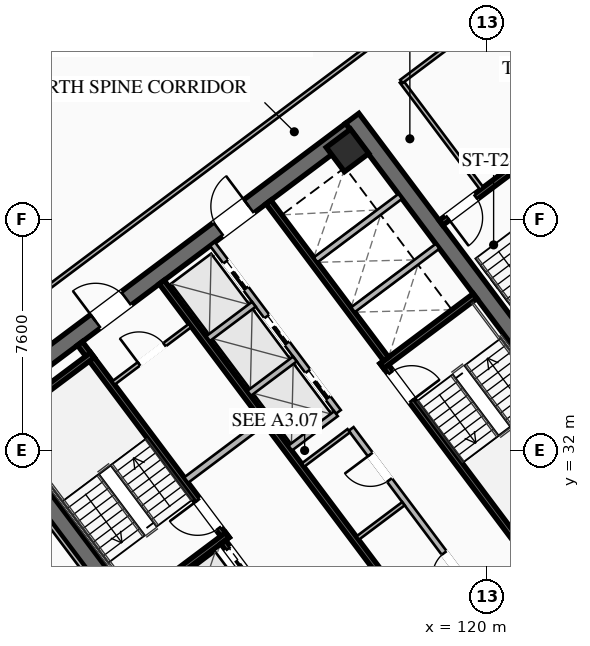
"""IFC4 building model, lengths in metres.
Left out: names, types, materials, properties, quantities, classifications, styles, units other than length and angle.
Written with IfcOpenShell. Run it as: python <this file> out.ifc"""

import sys

from ifc_helpers import new_model, si_unit, direction, frame, frame_2d, origin, origin_2d, place, context, subcontext, project, spatial, rectangle, hollow_rectangle, extrude, element, fill, save


model = new_model("IFC4")
c1 = context("Model", 3, precision=1e-05, world=origin(), true_north=direction((0.0, 1.0)))
c2 = subcontext(c1, "Body", "Model", "MODEL_VIEW")
j1 = project(units=[si_unit("LENGTHUNIT", "METRE"), si_unit("PLANEANGLEUNIT", "RADIAN")], contexts=[c1])
p1 = place(None, origin())
s1 = spatial("IfcSite", under=j1, at=p1, CompositionType="ELEMENT")
p2 = place(p1, origin())
s2 = spatial("IfcBuilding", under=s1, at=p2, CompositionType="ELEMENT")
p3 = place(p2, frame((0.0, 0.0, 121.5)))
s3 = spatial("IfcBuildingStorey", under=s2, at=p3, CompositionType="ELEMENT", Elevation=121.5)
for number, where, z_axis, x_axis in (
    (1, (112.436, 21.077, 0.0), (0.0, 0.0, 1.0), (-0.6, 0.8, 0.0)),
    (2, (115.564, 42.923, 0.0), (0.0, 0.0, 1.0), (0.6, -0.8, 0.0)),
):
    element("IfcWall", number, at=place(p3, frame(where, z_axis=z_axis, x_axis=x_axis)), inside=s3, PredefinedType="SHEAR", context=c2, shape_type="SweptSolid", body=[
        extrude(rectangle(XDim=15.6, YDim=0.55, at=frame_2d((7.8, 0.0))), origin(), (0.0, 0.0, 1.0), 3.55),
    ])
p4 = place(p3, frame((124.539, 30.498, 0.0), z_axis=(0.0, 0.0, 1.0), x_axis=(-0.799998054672, -0.600002593761, 0.0)))
e3 = element("IfcWall", 3, at=p4, inside=s3, PredefinedType="SHEAR", context=c2, shape_type="SweptSolid", body=[
    extrude(rectangle(XDim=15.06, YDim=0.55, at=frame_2d((7.53, 0.0))), origin(), (0.0, 0.0, 1.0), 3.55),
])
p5 = place(p4, frame((9.23, 0.0, 0.0)))
e4 = element("IfcOpeningElement", 4, at=p5, cuts=e3, PredefinedType="OPENING", context=c2, shape_type="SweptSolid", body=[
    extrude(rectangle(XDim=1.25, YDim=2.25, at=frame_2d((0.625, 1.125))), frame((0.0, 0.285, 0.0), z_axis=(0.0, -1.0, 0.0), x_axis=(1.0, 0.0, 0.0)), (0.0, 0.0, 1.0), 0.57),
])
p6 = place(p4, frame((4.18, 0.0, 0.0)))
e5 = element("IfcOpeningElement", 5, at=p6, cuts=e3, PredefinedType="OPENING", context=c2, shape_type="SweptSolid", body=[
    extrude(rectangle(XDim=1.25, YDim=2.25, at=frame_2d((0.625, 1.125))), frame((0.0, 0.285, 0.0), z_axis=(0.0, -1.0, 0.0), x_axis=(1.0, 0.0, 0.0)), (0.0, 0.0, 1.0), 0.57),
])
p7 = place(p3, frame((103.461, 33.502, 0.0), z_axis=(0.0, 0.0, 1.0), x_axis=(0.799998054672, 0.600002593761, 0.0)))
e6 = element("IfcWall", 6, at=p7, inside=s3, PredefinedType="SHEAR", context=c2, shape_type="SweptSolid", body=[
    extrude(rectangle(XDim=15.06, YDim=0.55, at=frame_2d((7.53, 0.0))), origin(), (0.0, 0.0, 1.0), 3.55),
])
p8 = place(p7, frame((4.58, 0.0, 0.0)))
e7 = element("IfcOpeningElement", 7, at=p8, cuts=e6, PredefinedType="OPENING", context=c2, shape_type="SweptSolid", body=[
    extrude(rectangle(XDim=1.25, YDim=2.25, at=frame_2d((0.625, 1.125))), frame((0.0, 0.285, 0.0), z_axis=(0.0, -1.0, 0.0), x_axis=(1.0, 0.0, 0.0)), (0.0, 0.0, 1.0), 0.57),
])
p9 = place(p7, frame((9.63, 0.0, 0.0)))
e8 = element("IfcOpeningElement", 8, at=p9, cuts=e6, PredefinedType="OPENING", context=c2, shape_type="SweptSolid", body=[
    extrude(rectangle(XDim=1.25, YDim=2.25, at=frame_2d((0.625, 1.125))), frame((0.0, 0.285, 0.0), z_axis=(0.0, -1.0, 0.0), x_axis=(1.0, 0.0, 0.0)), (0.0, 0.0, 1.0), 0.57),
])
p10 = place(p3, frame((115.41, 41.87, 0.0), z_axis=(0.0, 0.0, 1.0), x_axis=(0.799999996291, 0.600000004945, 0.0)))
e9 = element("IfcColumn", 9, at=p10, inside=s3, PredefinedType="COLUMN", context=c2, shape_type="SweptSolid", body=[
    extrude(hollow_rectangle(XDim=1.0, YDim=1.0, WallThickness=0.04, at=origin_2d()), origin(), (0.0, 0.0, 1.0), 3.37),
])
p11 = place(p3, frame((111.44, 29.08, 0.0), z_axis=(0.0, 0.0, 1.0), x_axis=(-0.59999029481, 0.8000072788, 0.0)))
e10 = element("IfcWall", 10, at=p11, inside=s3, PredefinedType="SHEAR", context=c2, shape_type="SweptSolid", body=[
    extrude(rectangle(XDim=8.05, YDim=0.2, at=frame_2d((4.025, 0.0))), origin(), (0.0, 0.0, 1.0), 3.37),
])
p12 = place(p11, frame((0.45, 0.0, 0.0)))
e11 = element("IfcOpeningElement", 11, at=p12, cuts=e10, PredefinedType="OPENING", context=c2, shape_type="SweptSolid", body=[
    extrude(rectangle(XDim=1.15, YDim=2.2, at=frame_2d((0.575, 1.1))), frame((0.0, 0.11, 0.0), z_axis=(0.0, -1.0, 0.0), x_axis=(1.0, 0.0, 0.0)), (0.0, 0.0, 1.0), 0.22),
])
for number, where, z_axis, x_axis in (
    (12, (108.396, 26.922, 0.0), (0.0, 0.0, 1.0), (0.8, 0.6, 0.0)),
    (13, (103.956, 32.842, 0.0), (0.0, 0.0, 1.0), (0.8, 0.6, 0.0)),
):
    element("IfcWall", number, at=place(p3, frame(where, z_axis=z_axis, x_axis=x_axis)), inside=s3, PredefinedType="SHEAR", context=c2, shape_type="SweptSolid", body=[
        extrude(rectangle(XDim=3.83, YDim=0.2, at=frame_2d((1.915, 0.0))), origin(), (0.0, 0.0, 1.0), 3.37),
    ])
p13 = place(p3, frame((116.56, 34.92, 0.0), z_axis=(0.0, 0.0, 1.0), x_axis=(0.59999029481, -0.8000072788, 0.0)))
e14 = element("IfcWall", 14, at=p13, inside=s3, PredefinedType="SHEAR", context=c2, shape_type="SweptSolid", body=[
    extrude(rectangle(XDim=8.05, YDim=0.2, at=frame_2d((4.025, 0.0))), origin(), (0.0, 0.0, 1.0), 3.37),
])
p14 = place(p13, frame((0.45, 0.0, 0.0)))
e15 = element("IfcOpeningElement", 15, at=p14, cuts=e14, PredefinedType="OPENING", context=c2, shape_type="SweptSolid", body=[
    extrude(rectangle(XDim=1.15, YDim=2.2, at=frame_2d((0.575, 1.1))), frame((0.0, 0.11, 0.0), z_axis=(0.0, -1.0, 0.0), x_axis=(1.0, 0.0, 0.0)), (0.0, 0.0, 1.0), 0.22),
])
p15 = place(p3, frame((116.54, 34.78, 0.0), z_axis=(0.0, 0.0, 1.0), x_axis=(0.800015298837, 0.599979601008, 0.0)))
e16 = element("IfcWall", 16, at=p15, inside=s3, PredefinedType="SHEAR", context=c2, shape_type="SweptSolid", body=[
    extrude(rectangle(XDim=3.83, YDim=0.2, at=frame_2d((1.915, 0.0))), origin(), (0.0, 0.0, 1.0), 3.37),
])
p16 = place(p3, frame((117.998, 25.936, 0.0), z_axis=(0.0, 0.0, 1.0), x_axis=(-0.600002693989, 0.799997979501, 0.0)))
e17 = element("IfcWall", 17, at=p16, inside=s3, PredefinedType="SHEAR", context=c2, shape_type="SweptSolid", body=[
    extrude(rectangle(XDim=14.5, YDim=0.2, at=frame_2d((7.25, 0.0))), origin(), (0.0, 0.0, 1.0), 3.37),
])
p17 = place(p3, frame((110.104, 31.028, 0.0), z_axis=(0.0, 0.0, 1.0), x_axis=(0.800018601094, 0.59997519774, 0.0)))
e18 = element("IfcWall", 18, at=p17, inside=s3, PredefinedType="SOLIDWALL", context=c2, shape_type="SweptSolid", body=[
    extrude(rectangle(XDim=3.15, YDim=0.22, at=frame_2d((1.575, 0.0))), origin(), (0.0, 0.0, 1.0), 2.723),
])
p18 = place(p3, frame((115.19, 23.83, 0.0), z_axis=(0.0, 0.0, 1.0), x_axis=(-0.599993943644, 0.800004542231, 0.0)))
e19 = element("IfcWall", 19, at=p18, inside=s3, PredefinedType="SHEAR", context=c2, shape_type="SweptSolid", body=[
    extrude(rectangle(XDim=6.45, YDim=0.2, at=frame_2d((3.225, 0.0))), origin(), (0.0, 0.0, 1.0), 3.37),
])
p19 = place(p18, frame((4.875, 0.0, 0.0)))
e20 = element("IfcOpeningElement", 20, at=p19, cuts=e19, PredefinedType="OPENING", context=c2, shape_type="SweptSolid", body=[
    extrude(rectangle(XDim=1.3, YDim=2.25, at=frame_2d((0.65, 1.125))), frame((0.0, 0.11, 0.0), z_axis=(0.0, -1.0, 0.0), x_axis=(1.0, 0.0, 0.0)), (0.0, 0.0, 1.0), 0.22),
])
p20 = place(p18, frame((2.875, 0.0, 0.0)))
e21 = element("IfcOpeningElement", 21, at=p20, cuts=e19, PredefinedType="OPENING", context=c2, shape_type="SweptSolid", body=[
    extrude(rectangle(XDim=1.3, YDim=2.25, at=frame_2d((0.65, 1.125))), frame((0.0, 0.11, 0.0), z_axis=(0.0, -1.0, 0.0), x_axis=(1.0, 0.0, 0.0)), (0.0, 0.0, 1.0), 0.22),
])
p21 = place(p18, frame((0.675, 0.0, 0.0)))
e22 = element("IfcOpeningElement", 22, at=p21, cuts=e19, PredefinedType="OPENING", context=c2, shape_type="SweptSolid", body=[
    extrude(rectangle(XDim=1.3, YDim=2.25, at=frame_2d((0.65, 1.125))), frame((0.0, 0.11, 0.0), z_axis=(0.0, -1.0, 0.0), x_axis=(1.0, 0.0, 0.0)), (0.0, 0.0, 1.0), 0.22),
])
p22 = place(p3, frame((112.81, 40.17, 0.0), z_axis=(0.0, 0.0, 1.0), x_axis=(0.599993943644, -0.800004542231, 0.0)))
e23 = element("IfcWall", 23, at=p22, inside=s3, PredefinedType="SHEAR", context=c2, shape_type="SweptSolid", body=[
    extrude(rectangle(XDim=6.45, YDim=0.2, at=frame_2d((3.225, 0.0))), origin(), (0.0, 0.0, 1.0), 3.37),
])
for number, where, z_axis, x_axis in (
    (24, (115.59, 36.63, 0.0), (0.0, 0.0, 1.0), (0.8, 0.6, 0.0)),
    (25, (114.36, 38.27, 0.0), (0.0, 0.0, 1.0), (0.8, 0.6, 0.0)),
):
    element("IfcWall", number, at=place(p3, frame(where, z_axis=z_axis, x_axis=x_axis)), inside=s3, PredefinedType="SOLIDWALL", context=c2, shape_type="SweptSolid", body=[
        extrude(rectangle(XDim=3.48, YDim=0.2, at=frame_2d((1.74, 0.0))), origin(), (0.0, 0.0, 1.0), 3.37),
    ])
p23 = place(p3, frame((107.71, 34.22, 0.0), z_axis=(0.0, 0.0, 1.0), x_axis=(0.799981399002, 0.60002480053, 0.0)))
e26 = element("IfcWall", 26, at=p23, inside=s3, PredefinedType="PARTITIONING", context=c2, shape_type="SweptSolid", body=[
    extrude(rectangle(XDim=3.15, YDim=0.135, at=frame_2d((1.575, 0.0))), origin(), (0.0, 0.0, 1.0), 2.723),
])
p24 = place(p23, frame((1.05, 0.0, 0.0)))
e27 = element("IfcOpeningElement", 27, at=p24, cuts=e26, PredefinedType="OPENING", context=c2, shape_type="SweptSolid", body=[
    extrude(rectangle(XDim=1.05, YDim=2.2, at=frame_2d((0.525, 1.1))), frame((0.0, 0.077, 0.0), z_axis=(0.0, -1.0, 0.0), x_axis=(1.0, 0.0, 0.0)), (0.0, 0.0, 1.0), 0.155),
])
p25 = place(p3, frame((119.67, 27.19, 0.0), z_axis=(0.0, 0.0, 1.0), x_axis=(-0.599988677396, 0.800008491828, 0.0)))
e28 = element("IfcWall", 28, at=p25, inside=s3, PredefinedType="SOLIDWALL", context=c2, shape_type="SweptSolid", body=[
    extrude(rectangle(XDim=6.9, YDim=0.2, at=frame_2d((3.45, 0.0))), origin(), (0.0, 0.0, 1.0), 2.723),
])
p26 = place(p25, frame((0.85, 0.0, 0.0)))
e29 = element("IfcOpeningElement", 29, at=p26, cuts=e28, PredefinedType="OPENING", context=c2, shape_type="SweptSolid", body=[
    extrude(rectangle(XDim=0.95, YDim=2.05, at=frame_2d((0.475, 1.025))), frame((0.0, 0.11, 0.0), z_axis=(0.0, -1.0, 0.0), x_axis=(1.0, 0.0, 0.0)), (0.0, 0.0, 1.0), 0.22),
])
p27 = place(p25, frame((4.8, 0.0, 0.0)))
e30 = element("IfcOpeningElement", 30, at=p27, cuts=e28, PredefinedType="OPENING", context=c2, shape_type="SweptSolid", body=[
    extrude(rectangle(XDim=1.05, YDim=2.2, at=frame_2d((0.525, 1.1))), frame((0.0, 0.11, 0.0), z_axis=(0.0, -1.0, 0.0), x_axis=(1.0, 0.0, 0.0)), (0.0, 0.0, 1.0), 0.22),
])
for number, where, z_axis, x_axis in (
    (31, (113.946, 31.522, 0.0), (0.0, 0.0, 1.0), (0.8, 0.6, 0.0)),
    (32, (115.746, 29.122, 0.0), (0.0, 0.0, 1.0), (0.8, 0.6, 0.0)),
):
    element("IfcWall", number, at=place(p3, frame(where, z_axis=z_axis, x_axis=x_axis)), inside=s3, PredefinedType="PARTITIONING", context=c2, shape_type="SweptSolid", body=[
        extrude(rectangle(XDim=1.88, YDim=0.135, at=frame_2d((0.94, 0.0))), origin(), (0.0, 0.0, 1.0), 2.723),
    ])
p28 = place(p3, frame((115.11, 33.27, 0.0), z_axis=(0.0, 0.0, 1.0), x_axis=(-0.600011322243, 0.799991508192, 0.0)))
e33 = element("IfcWall", 33, at=p28, inside=s3, PredefinedType="SOLIDWALL", context=c2, shape_type="SweptSolid", body=[
    extrude(rectangle(XDim=6.9, YDim=0.2, at=frame_2d((3.45, 0.0))), origin(), (0.0, 0.0, 1.0), 3.37),
])
p29 = place(p28, frame((0.575, 0.0, 0.0)))
e34 = element("IfcOpeningElement", 34, at=p29, cuts=e33, PredefinedType="OPENING", context=c2, shape_type="SweptSolid", body=[
    extrude(rectangle(XDim=1.1, YDim=2.2, at=frame_2d((0.55, 1.1))), frame((0.0, 0.11, 0.0), z_axis=(0.0, -1.0, 0.0), x_axis=(1.0, 0.0, 0.0)), (0.0, 0.0, 1.0), 0.22),
])
p30 = place(p28, frame((2.825, 0.0, 0.0)))
e35 = element("IfcOpeningElement", 35, at=p30, cuts=e33, PredefinedType="OPENING", context=c2, shape_type="SweptSolid", body=[
    extrude(rectangle(XDim=1.1, YDim=2.2, at=frame_2d((0.55, 1.1))), frame((0.0, 0.11, 0.0), z_axis=(0.0, -1.0, 0.0), x_axis=(1.0, 0.0, 0.0)), (0.0, 0.0, 1.0), 0.22),
])
p31 = place(p28, frame((5.075, 0.0, 0.0)))
e36 = element("IfcOpeningElement", 36, at=p31, cuts=e33, PredefinedType="OPENING", context=c2, shape_type="SweptSolid", body=[
    extrude(rectangle(XDim=1.1, YDim=2.2, at=frame_2d((0.55, 1.1))), frame((0.0, 0.11, 0.0), z_axis=(0.0, -1.0, 0.0), x_axis=(1.0, 0.0, 0.0)), (0.0, 0.0, 1.0), 0.22),
])
p32 = place(p3, frame((113.526, 32.082, 0.0), z_axis=(0.0, 0.0, 1.0), x_axis=(0.800046745961, 0.599937666993, 0.0)))
e37 = element("IfcWall", 37, at=p32, inside=s3, PredefinedType="SOLIDWALL", context=c2, shape_type="SweptSolid", body=[
    extrude(rectangle(XDim=1.88, YDim=0.2, at=frame_2d((0.94, 0.0))), origin(), (0.0, 0.0, 1.0), 3.37),
])
p33 = place(p3, frame((112.176, 33.882, 0.0), z_axis=(0.0, 0.0, 1.0), x_axis=(0.8, 0.6, 0.0)))
e38 = element("IfcWall", 38, at=p33, inside=s3, PredefinedType="SOLIDWALL", context=c2, shape_type="SweptSolid", body=[
    extrude(rectangle(XDim=1.88, YDim=0.2, at=frame_2d((0.94, 0.0))), origin(), (0.0, 0.0, 1.0), 3.37),
])
p34 = place(p3, frame((110.826, 35.682, 0.0), z_axis=(0.0, 0.0, 1.0), x_axis=(0.799984418148, 0.600020775241, 0.0)))
e39 = element("IfcWall", 39, at=p34, inside=s3, PredefinedType="SOLIDWALL", context=c2, shape_type="SweptSolid", body=[
    extrude(rectangle(XDim=1.88, YDim=0.2, at=frame_2d((0.94, 0.0))), origin(), (0.0, 0.0, 1.0), 3.37),
])
p35 = place(p3, frame((121.204, 41.528, 0.0), z_axis=(0.0, 0.0, 1.0), x_axis=(-0.800017232136, -0.599977023131, 0.0)))
e40 = element("IfcWall", 40, at=p35, inside=s3, PredefinedType="SHEAR", context=c2, shape_type="SweptSolid", body=[
    extrude(rectangle(XDim=3.4, YDim=0.2, at=frame_2d((1.7, 0.0))), origin(), (0.0, 0.0, 1.0), 3.37),
])
p36 = place(p35, frame((1.975, 0.0, 0.0)))
e41 = element("IfcOpeningElement", 41, at=p36, cuts=e40, PredefinedType="OPENING", context=c2, shape_type="SweptSolid", body=[
    extrude(rectangle(XDim=1.15, YDim=2.2, at=frame_2d((0.575, 1.1))), frame((0.0, 0.11, 0.0), z_axis=(0.0, -1.0, 0.0), x_axis=(1.0, 0.0, 0.0)), (0.0, 0.0, 1.0), 0.22),
])
p37 = place(p3, frame((119.824, 40.618, 0.0), z_axis=(0.0, 0.0, 1.0), x_axis=(-0.599982243973, 0.800013316712, 0.0)))
e42 = element("IfcWall", 42, at=p37, inside=s3, PredefinedType="PARTITIONING", context=c2, shape_type="SweptSolid", body=[
    extrude(rectangle(XDim=4.4, YDim=0.135, at=frame_2d((2.2, 0.0))), origin(), (0.0, 0.0, 1.0), 2.723),
])
p38 = place(p3, frame((95.87, 30.09, 0.0), z_axis=(0.0, 0.0, 1.0), x_axis=(0.799997191971, 0.600003744021, 0.0)))
e43 = element("IfcWall", 43, at=p38, inside=s3, PredefinedType="PARTITIONING", context=c2, shape_type="SweptSolid", body=[
    extrude(rectangle(XDim=31.3, YDim=0.135, at=frame_2d((15.65, 0.0))), origin(), (0.0, 0.0, 1.0), 2.723),
])
p39 = place(p38, frame((0.3, 0.0, 0.0)))
e44 = element("IfcOpeningElement", 44, at=p39, cuts=e43, PredefinedType="OPENING", context=c2, shape_type="SweptSolid", body=[
    extrude(rectangle(XDim=0.95, YDim=2.05, at=frame_2d((0.475, 1.025))), frame((0.0, 0.077, 0.0), z_axis=(0.0, -1.0, 0.0), x_axis=(1.0, 0.0, 0.0)), (0.0, 0.0, 1.0), 0.155),
])
p40 = place(p38, frame((30.05, 0.0, 0.0)))
e45 = element("IfcOpeningElement", 45, at=p40, cuts=e43, PredefinedType="OPENING", context=c2, shape_type="SweptSolid", body=[
    extrude(rectangle(XDim=0.95, YDim=2.05, at=frame_2d((0.475, 1.025))), frame((0.0, 0.077, 0.0), z_axis=(0.0, -1.0, 0.0), x_axis=(1.0, 0.0, 0.0)), (0.0, 0.0, 1.0), 0.155),
])
p41 = place(p3, frame((133.282, 32.374, 0.0), z_axis=(0.0, 0.0, 1.0), x_axis=(-0.8, -0.6, 0.0)))
e46 = element("IfcWall", 46, at=p41, inside=s3, PredefinedType="PARTITIONING", context=c2, shape_type="SweptSolid", body=[
    extrude(rectangle(XDim=31.3, YDim=0.135, at=frame_2d((15.65, 0.0))), origin(), (0.0, 0.0, 1.0), 2.723),
])
p42 = place(p41, frame((29.97, 0.0, 0.0)))
e47 = element("IfcOpeningElement", 47, at=p42, cuts=e46, PredefinedType="OPENING", context=c2, shape_type="SweptSolid", body=[
    extrude(rectangle(XDim=0.95, YDim=2.05, at=frame_2d((0.475, 1.025))), frame((0.0, 0.077, 0.0), z_axis=(0.0, -1.0, 0.0), x_axis=(1.0, 0.0, 0.0)), (0.0, 0.0, 1.0), 0.155),
])
p43 = place(p41, frame((19.151, 0.0, 0.0)))
e48 = element("IfcOpeningElement", 48, at=p43, cuts=e46, PredefinedType="OPENING", context=c2, shape_type="SweptSolid", body=[
    extrude(rectangle(XDim=0.95, YDim=2.05, at=frame_2d((0.475, 1.025))), frame((0.0, 0.077, 0.0), z_axis=(0.0, -1.0, 0.0), x_axis=(1.0, 0.0, 0.0)), (0.0, 0.0, 1.0), 0.155),
])
p44 = place(p41, frame((14.901, 0.0, 0.0)))
e49 = element("IfcOpeningElement", 49, at=p44, cuts=e46, PredefinedType="OPENING", context=c2, shape_type="SweptSolid", body=[
    extrude(rectangle(XDim=0.95, YDim=2.05, at=frame_2d((0.475, 1.025))), frame((0.0, 0.077, 0.0), z_axis=(0.0, -1.0, 0.0), x_axis=(1.0, 0.0, 0.0)), (0.0, 0.0, 1.0), 0.155),
])
p45 = place(p41, frame((10.92, 0.0, 0.0)))
e50 = element("IfcOpeningElement", 50, at=p45, cuts=e46, PredefinedType="OPENING", context=c2, shape_type="SweptSolid", body=[
    extrude(rectangle(XDim=0.95, YDim=2.05, at=frame_2d((0.475, 1.025))), frame((0.0, 0.077, 0.0), z_axis=(0.0, -1.0, 0.0), x_axis=(1.0, 0.0, 0.0)), (0.0, 0.0, 1.0), 0.155),
])
p46 = place(p41, frame((0.38, 0.0, 0.0)))
e51 = element("IfcOpeningElement", 51, at=p46, cuts=e46, PredefinedType="OPENING", context=c2, shape_type="SweptSolid", body=[
    extrude(rectangle(XDim=0.95, YDim=2.05, at=frame_2d((0.475, 1.025))), frame((0.0, 0.077, 0.0), z_axis=(0.0, -1.0, 0.0), x_axis=(1.0, 0.0, 0.0)), (0.0, 0.0, 1.0), 0.155),
])
p47 = place(p3, frame((123.944, 49.208, 0.0), z_axis=(0.0, 0.0, 1.0), x_axis=(-0.799996532921, -0.600004622744, 0.0)))
e52 = element("IfcWall", 52, at=p47, inside=s3, PredefinedType="PARTITIONING", context=c2, shape_type="SweptSolid", body=[
    extrude(rectangle(XDim=8.45, YDim=0.135, at=frame_2d((4.225, 0.0))), origin(), (0.0, 0.0, 1.0), 2.723),
])
p48 = place(p47, frame((4.1, 0.0, 0.0)))
e53 = element("IfcOpeningElement", 53, at=p48, cuts=e52, PredefinedType="OPENING", context=c2, shape_type="SweptSolid", body=[
    extrude(rectangle(XDim=0.95, YDim=2.05, at=frame_2d((0.475, 1.025))), frame((0.0, 0.077, 0.0), z_axis=(0.0, -1.0, 0.0), x_axis=(1.0, 0.0, 0.0)), (0.0, 0.0, 1.0), 0.155),
])
p49 = place(p3, frame((112.104, 20.928, 0.0), z_axis=(0.0, 0.0, 1.0), x_axis=(-0.599994940075, 0.800003794918, 0.0)))
e54 = element("IfcWall", 54, at=p49, inside=s3, PredefinedType="PARTITIONING", context=c2, shape_type="SweptSolid", body=[
    extrude(rectangle(XDim=15.44, YDim=0.135, at=frame_2d((7.72, 0.0))), origin(), (0.0, 0.0, 1.0), 2.723),
])
p50 = place(p8, origin())
e55 = element("IfcDoor", 55, at=p50, inside=s3, OperationType="SINGLE_SWING_LEFT", PredefinedType="DOOR", context=c2, shape_type="SweptSolid", body=[
    extrude(rectangle(XDim=1.25, YDim=2.25, at=frame_2d((0.625, 1.125))), frame((0.0, 0.025, 0.0), z_axis=(0.0, -1.0, 0.0), x_axis=(1.0, 0.0, 0.0)), (0.0, 0.0, 1.0), 0.05),
])
fill(e7, e55)
p51 = place(p9, origin())
e56 = element("IfcDoor", 56, at=p51, inside=s3, OperationType="SINGLE_SWING_RIGHT", PredefinedType="DOOR", context=c2, shape_type="SweptSolid", body=[
    extrude(rectangle(XDim=1.25, YDim=2.25, at=frame_2d((0.625, 1.125))), frame((0.0, 0.025, 0.0), z_axis=(0.0, -1.0, 0.0), x_axis=(1.0, 0.0, 0.0)), (0.0, 0.0, 1.0), 0.05),
])
fill(e8, e56)
p52 = place(p12, origin())
e57 = element("IfcDoor", 57, at=p52, inside=s3, OperationType="SINGLE_SWING_RIGHT", PredefinedType="DOOR", context=c2, shape_type="SweptSolid", body=[
    extrude(rectangle(XDim=1.15, YDim=2.2, at=frame_2d((0.575, 1.1))), frame((0.0, 0.025, 0.0), z_axis=(0.0, -1.0, 0.0), x_axis=(1.0, 0.0, 0.0)), (0.0, 0.0, 1.0), 0.05),
])
fill(e11, e57)
p53 = place(p14, origin())
e58 = element("IfcDoor", 58, at=p53, inside=s3, OperationType="SINGLE_SWING_RIGHT", PredefinedType="DOOR", context=c2, shape_type="SweptSolid", body=[
    extrude(rectangle(XDim=1.15, YDim=2.2, at=frame_2d((0.575, 1.1))), frame((0.0, 0.025, 0.0), z_axis=(0.0, -1.0, 0.0), x_axis=(1.0, 0.0, 0.0)), (0.0, 0.0, 1.0), 0.05),
])
fill(e15, e58)
p54 = place(p24, origin())
e59 = element("IfcDoor", 59, at=p54, inside=s3, OperationType="SINGLE_SWING_LEFT", PredefinedType="DOOR", context=c2, shape_type="SweptSolid", body=[
    extrude(rectangle(XDim=1.05, YDim=2.2, at=frame_2d((0.525, 1.1))), frame((0.0, 0.025, 0.0), z_axis=(0.0, -1.0, 0.0), x_axis=(1.0, 0.0, 0.0)), (0.0, 0.0, 1.0), 0.05),
])
fill(e27, e59)
p55 = place(p26, origin())
e60 = element("IfcDoor", 60, at=p55, inside=s3, OperationType="SINGLE_SWING_LEFT", PredefinedType="DOOR", context=c2, shape_type="SweptSolid", body=[
    extrude(rectangle(XDim=0.95, YDim=2.05, at=frame_2d((0.475, 1.025))), frame((0.0, 0.025, 0.0), z_axis=(0.0, -1.0, 0.0), x_axis=(1.0, 0.0, 0.0)), (0.0, 0.0, 1.0), 0.05),
])
fill(e29, e60)
p56 = place(p27, origin())
e61 = element("IfcDoor", 61, at=p56, inside=s3, OperationType="SINGLE_SWING_RIGHT", PredefinedType="DOOR", context=c2, shape_type="SweptSolid", body=[
    extrude(rectangle(XDim=1.05, YDim=2.2, at=frame_2d((0.525, 1.1))), frame((0.0, 0.025, 0.0), z_axis=(0.0, -1.0, 0.0), x_axis=(1.0, 0.0, 0.0)), (0.0, 0.0, 1.0), 0.05),
])
fill(e30, e61)
p57 = place(p36, origin())
e62 = element("IfcDoor", 62, at=p57, inside=s3, OperationType="SINGLE_SWING_RIGHT", PredefinedType="DOOR", context=c2, shape_type="SweptSolid", body=[
    extrude(rectangle(XDim=1.15, YDim=2.2, at=frame_2d((0.575, 1.1))), frame((0.0, 0.025, 0.0), z_axis=(0.0, -1.0, 0.0), x_axis=(1.0, 0.0, 0.0)), (0.0, 0.0, 1.0), 0.05),
])
fill(e41, e62)
p58 = place(p19, origin())
e63 = element("IfcDoor", 63, at=p58, inside=s3, OperationType="SLIDING_TO_LEFT", PredefinedType="DOOR", context=c2, shape_type="SweptSolid", body=[
    extrude(rectangle(XDim=1.3, YDim=2.25, at=frame_2d((0.65, 1.125))), frame((0.0, 0.025, 0.0), z_axis=(0.0, -1.0, 0.0), x_axis=(1.0, 0.0, 0.0)), (0.0, 0.0, 1.0), 0.05),
])
fill(e20, e63)
p59 = place(p29, origin())
e64 = element("IfcDoor", 64, at=p59, inside=s3, OperationType="SLIDING_TO_LEFT", PredefinedType="DOOR", context=c2, shape_type="SweptSolid", body=[
    extrude(rectangle(XDim=1.1, YDim=2.2, at=frame_2d((0.55, 1.1))), frame((0.0, 0.025, 0.0), z_axis=(0.0, -1.0, 0.0), x_axis=(1.0, 0.0, 0.0)), (0.0, 0.0, 1.0), 0.05),
])
fill(e34, e64)
p60 = place(p30, origin())
e65 = element("IfcDoor", 65, at=p60, inside=s3, OperationType="SLIDING_TO_LEFT", PredefinedType="DOOR", context=c2, shape_type="SweptSolid", body=[
    extrude(rectangle(XDim=1.1, YDim=2.2, at=frame_2d((0.55, 1.1))), frame((0.0, 0.025, 0.0), z_axis=(0.0, -1.0, 0.0), x_axis=(1.0, 0.0, 0.0)), (0.0, 0.0, 1.0), 0.05),
])
fill(e35, e65)
p61 = place(p31, origin())
e66 = element("IfcDoor", 66, at=p61, inside=s3, OperationType="SLIDING_TO_LEFT", PredefinedType="DOOR", context=c2, shape_type="SweptSolid", body=[
    extrude(rectangle(XDim=1.1, YDim=2.2, at=frame_2d((0.55, 1.1))), frame((0.0, 0.025, 0.0), z_axis=(0.0, -1.0, 0.0), x_axis=(1.0, 0.0, 0.0)), (0.0, 0.0, 1.0), 0.05),
])
fill(e36, e66)
save(model, sys.argv[1])
